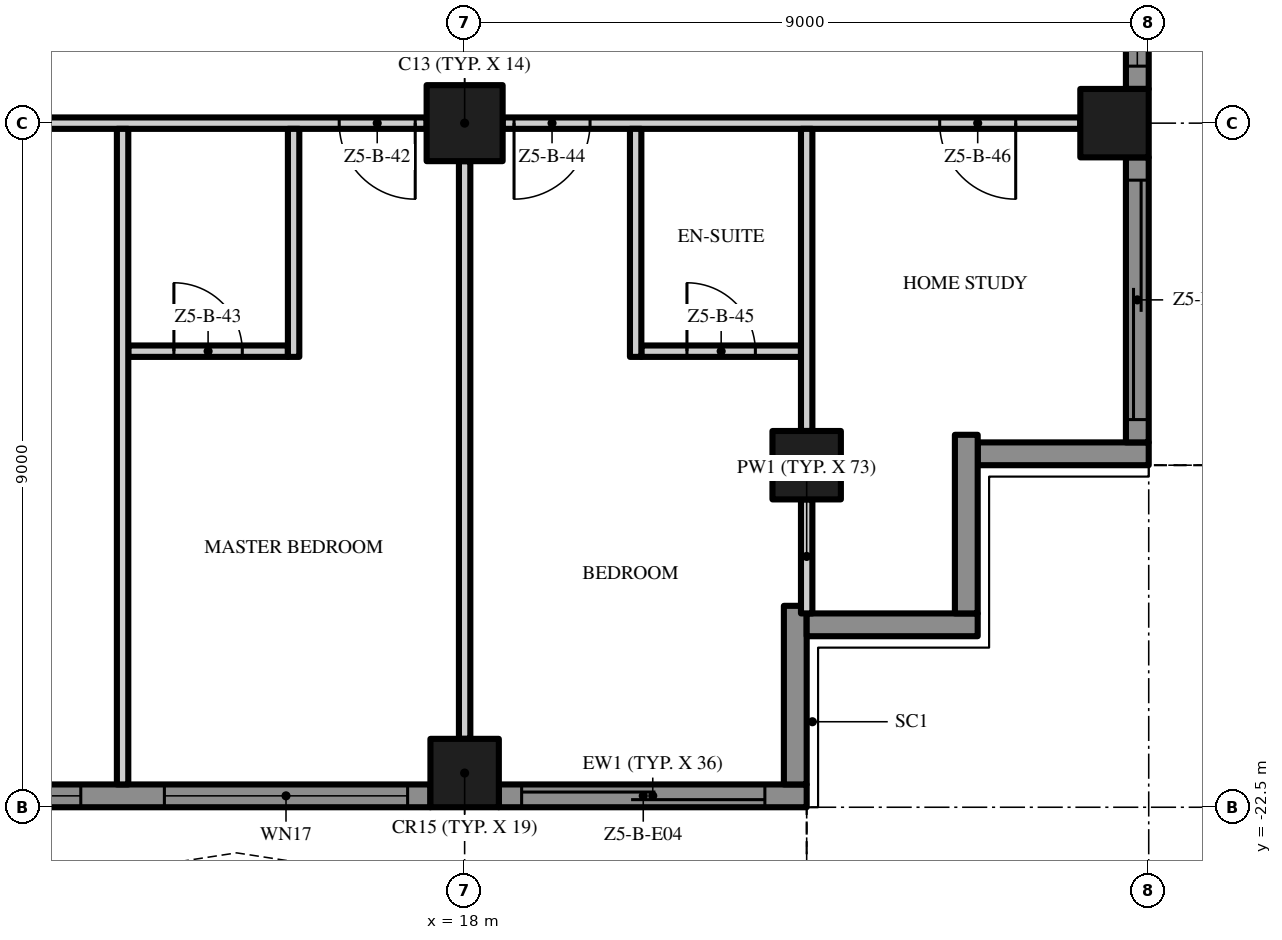
"""IFC4 building model, lengths in metres.
Left out: names, types, materials, properties, quantities, classifications, styles, units other than length and angle.
Written with IfcOpenShell. Run it as: python <this file> out.ifc"""

import sys

from ifc_helpers import new_model, si_unit, direction, frame, frame_2d, origin, origin_2d, place, context, subcontext, project, spatial, polyline, rectangle, outline, extrude, element, fill, save


model = new_model("IFC4")
c1 = context("Model", 3, precision=1e-05, world=origin(), true_north=direction((0.0, 1.0)))
c2 = subcontext(c1, "Body", "Model", "MODEL_VIEW")
j1 = project(units=[si_unit("LENGTHUNIT", "METRE"), si_unit("PLANEANGLEUNIT", "RADIAN")], contexts=[c1])
p1 = place(None, origin())
s1 = spatial("IfcSite", under=j1, at=p1, CompositionType="ELEMENT")
p2 = place(p1, origin())
s2 = spatial("IfcBuilding", under=s1, at=p2, CompositionType="ELEMENT")
p3 = place(p2, frame((0.0, 0.0, 250.2)))
s3 = spatial("IfcBuildingStorey", under=s2, at=p3, CompositionType="ELEMENT", Elevation=250.2)
p4 = place(p3, frame((18.0, -13.5, 0.0), z_axis=(0.0, 0.0, 1.0), x_axis=(1.0, 0.0, 0.0)))
e1 = element("IfcColumn", 1, at=p4, inside=s3, PredefinedType="COLUMN", context=c2, shape_type="SweptSolid", body=[
    extrude(rectangle(XDim=1.0, YDim=1.0, at=origin_2d()), origin(), (0.0, 0.0, 1.0), 3.5),
])
for number, where, z_axis, x_axis in (
    (2, (18.0, -22.05, 0.0), (0.0, 0.0, 1.0), (1.0, 0.0, 0.0)),
    (3, (26.55, -13.5, 0.0), (0.0, 0.0, 1.0), (1.0, 0.0, 0.0)),
    (4, (22.5, -18.0, 0.0), (0.0, 0.0, 1.0), (1.0, 0.0, 0.0)),
):
    element("IfcColumn", number, at=place(p3, frame(where, z_axis=z_axis, x_axis=x_axis)), inside=s3, PredefinedType="COLUMN", context=c2, shape_type="SweptSolid", body=[
        extrude(rectangle(XDim=0.9, YDim=0.9, at=origin_2d()), origin(), (0.0, 0.0, 1.0), 3.5),
    ])
p5 = place(p3, frame((17.55, -22.35, 0.0), z_axis=(0.0, 0.0, 1.0), x_axis=(-1.0, 0.0, 0.0)))
e5 = element("IfcWall", 5, at=p5, inside=s3, PredefinedType="SOLIDWALL", context=c2, shape_type="SweptSolid", body=[
    extrude(rectangle(XDim=8.1, YDim=0.3, at=frame_2d((4.05, 0.0))), origin(), (0.0, 0.0, 1.0), 3.5),
])
p6 = place(p5, frame((4.6, 0.0, 0.45)))
e6 = element("IfcOpeningElement", 6, at=p6, cuts=e5, PredefinedType="OPENING", context=c2, shape_type="SweptSolid", body=[
    extrude(rectangle(XDim=3.2, YDim=2.65, at=frame_2d((1.6, 1.325))), frame((0.0, 0.16, 0.0), z_axis=(0.0, -1.0, 0.0), x_axis=(1.0, 0.0, 0.0)), (0.0, 0.0, 1.0), 0.32),
])
p7 = place(p5, frame((0.3, 0.0, 0.45)))
e7 = element("IfcOpeningElement", 7, at=p7, cuts=e5, PredefinedType="OPENING", context=c2, shape_type="SweptSolid", body=[
    extrude(rectangle(XDim=3.2, YDim=2.65, at=frame_2d((1.6, 1.325))), frame((0.0, 0.16, 0.0), z_axis=(0.0, -1.0, 0.0), x_axis=(1.0, 0.0, 0.0)), (0.0, 0.0, 1.0), 0.32),
])
p8 = place(p3, frame((22.5, -22.35, 0.0), z_axis=(0.0, 0.0, 1.0), x_axis=(-1.0, 0.0, 0.0)))
e8 = element("IfcWall", 8, at=p8, inside=s3, PredefinedType="SOLIDWALL", context=c2, shape_type="SweptSolid", body=[
    extrude(rectangle(XDim=4.05, YDim=0.3, at=frame_2d((2.025, 0.0))), origin(), (0.0, 0.0, 1.0), 3.5),
])
p9 = place(p8, frame((0.55, 0.0, 0.0)))
e9 = element("IfcOpeningElement", 9, at=p9, cuts=e8, PredefinedType="OPENING", context=c2, shape_type="SweptSolid", body=[
    extrude(rectangle(XDim=3.2, YDim=2.4, at=frame_2d((1.6, 1.2))), frame((0.0, 0.16, 0.0), z_axis=(0.0, -1.0, 0.0), x_axis=(1.0, 0.0, 0.0)), (0.0, 0.0, 1.0), 0.32),
])
p10 = place(p3, frame((22.35, -19.85, 0.0), z_axis=(0.0, 0.0, 1.0), x_axis=(0.0, -1.0, 0.0)))
e10 = element("IfcWall", 10, at=p10, inside=s3, PredefinedType="SOLIDWALL", context=c2, shape_type="SweptSolid", body=[
    extrude(rectangle(XDim=2.35, YDim=0.3, at=frame_2d((1.175, 0.0))), origin(), (0.0, 0.0, 1.0), 3.5),
])
p11 = place(p3, frame((24.75, -20.1, 0.0), z_axis=(0.0, 0.0, 1.0), x_axis=(-1.0, 0.0, 0.0)))
e11 = element("IfcWall", 11, at=p11, inside=s3, PredefinedType="SOLIDWALL", context=c2, shape_type="SweptSolid", body=[
    extrude(rectangle(XDim=2.25, YDim=0.3, at=frame_2d((1.125, 0.0))), origin(), (0.0, 0.0, 1.0), 3.5),
])
p12 = place(p3, frame((24.6, -17.6, 0.0), z_axis=(0.0, 0.0, 1.0), x_axis=(0.0, -1.0, 0.0)))
e12 = element("IfcWall", 12, at=p12, inside=s3, PredefinedType="SOLIDWALL", context=c2, shape_type="SweptSolid", body=[
    extrude(rectangle(XDim=2.35, YDim=0.3, at=frame_2d((1.175, 0.0))), origin(), (0.0, 0.0, 1.0), 3.5),
])
p13 = place(p3, frame((27.0, -17.85, 0.0), z_axis=(0.0, 0.0, 1.0), x_axis=(-1.0, 0.0, 0.0)))
e13 = element("IfcWall", 13, at=p13, inside=s3, PredefinedType="SOLIDWALL", context=c2, shape_type="SweptSolid", body=[
    extrude(rectangle(XDim=2.25, YDim=0.3, at=frame_2d((1.125, 0.0))), origin(), (0.0, 0.0, 1.0), 3.5),
])
p14 = place(p3, frame((26.85, -13.95, 0.0), z_axis=(0.0, 0.0, 1.0), x_axis=(0.0, -1.0, 0.0)))
e14 = element("IfcWall", 14, at=p14, inside=s3, PredefinedType="SOLIDWALL", context=c2, shape_type="SweptSolid", body=[
    extrude(rectangle(XDim=3.75, YDim=0.3, at=frame_2d((1.875, 0.0))), origin(), (0.0, 0.0, 1.0), 3.5),
])
p15 = place(p14, frame((0.3, 0.0, 0.0)))
e15 = element("IfcOpeningElement", 15, at=p15, cuts=e14, PredefinedType="OPENING", context=c2, shape_type="SweptSolid", body=[
    extrude(rectangle(XDim=3.15, YDim=2.4, at=frame_2d((1.575, 1.2))), frame((0.0, 0.16, 0.0), z_axis=(0.0, -1.0, 0.0), x_axis=(1.0, 0.0, 0.0)), (0.0, 0.0, 1.0), 0.32),
])
p16 = place(p3, frame((26.85, -4.95, 0.0), z_axis=(0.0, 0.0, 1.0), x_axis=(0.0, -1.0, 0.0)))
e16 = element("IfcWall", 16, at=p16, inside=s3, PredefinedType="SOLIDWALL", context=c2, shape_type="SweptSolid", body=[
    extrude(rectangle(XDim=8.1, YDim=0.3, at=frame_2d((4.05, 0.0))), origin(), (0.0, 0.0, 1.0), 3.5),
])
p17 = place(p16, frame((4.6, 0.0, 0.45)))
e17 = element("IfcOpeningElement", 17, at=p17, cuts=e16, PredefinedType="OPENING", context=c2, shape_type="SweptSolid", body=[
    extrude(rectangle(XDim=3.2, YDim=2.65, at=frame_2d((1.6, 1.325))), frame((0.0, 0.16, 0.0), z_axis=(0.0, -1.0, 0.0), x_axis=(1.0, 0.0, 0.0)), (0.0, 0.0, 1.0), 0.32),
])
p18 = place(p16, frame((0.3, 0.0, 0.45)))
e18 = element("IfcOpeningElement", 18, at=p18, cuts=e16, PredefinedType="OPENING", context=c2, shape_type="SweptSolid", body=[
    extrude(rectangle(XDim=3.2, YDim=2.65, at=frame_2d((1.6, 1.325))), frame((0.0, 0.16, 0.0), z_axis=(0.0, -1.0, 0.0), x_axis=(1.0, 0.0, 0.0)), (0.0, 0.0, 1.0), 0.32),
])
p19 = place(p3, origin())
e19 = element("IfcWall", 19, at=p19, inside=s3, PredefinedType="USERDEFINED", context=c2, shape_type="SweptSolid", body=[
    extrude(outline(polyline([(-22.5, -25.5), (-21.0, -25.271), (-19.5, -24.671), (-18.0, -23.929), (-16.5, -23.329), (-15.0, -23.1), (-13.5, -23.329), (-12.0, -23.929), (-10.5, -24.671), (-9.0, -25.271), (-7.5, -25.5), (-6.0, -25.271), (-4.5, -24.671), (-3.0, -23.929), (-1.5, -23.329), (0.0, -23.1), (1.5, -23.329), (3.0, -23.929), (4.5, -24.671), (6.0, -25.271), (7.5, -25.5), (9.0, -25.271), (10.5, -24.671), (12.0, -23.929), (13.5, -23.329), (15.0, -23.1), (16.5, -23.329), (18.0, -23.929), (19.5, -24.671), (21.0, -25.271), (22.5, -25.5), (22.538, -25.253), (21.066, -25.028), (19.602, -24.442), (18.102, -23.701), (16.566, -23.086), (15.0, -22.847), (13.434, -23.086), (11.898, -23.701), (10.398, -24.442), (8.934, -25.028), (7.5, -25.247), (6.066, -25.028), (4.602, -24.442), (3.102, -23.701), (1.566, -23.086), (0.0, -22.847), (-1.566, -23.086), (-3.102, -23.701), (-4.602, -24.442), (-6.066, -25.028), (-7.5, -25.247), (-8.934, -25.028), (-10.398, -24.442), (-11.898, -23.701), (-13.434, -23.086), (-15.0, -22.847), (-16.566, -23.086), (-18.102, -23.701), (-19.602, -24.442), (-21.066, -25.028), (-22.538, -25.253), (-22.5, -25.5)])), origin(), (0.0, 0.0, 1.0), 0.9),
])
p20 = place(p3, origin())
e20 = element("IfcWall", 20, at=p20, inside=s3, PredefinedType="USERDEFINED", context=c2, shape_type="SweptSolid", body=[
    extrude(outline(polyline([(30.0, -18.0), (29.771, -16.5), (29.171, -15.0), (28.429, -13.5), (27.829, -12.0), (27.6, -10.5), (27.829, -9.0), (28.429, -7.5), (29.171, -6.0), (29.771, -4.5), (30.0, -3.0), (29.771, -1.5), (29.171, 0.0), (28.429, 1.5), (27.829, 3.0), (27.6, 4.5), (27.829, 6.0), (28.429, 7.5), (29.171, 9.0), (29.771, 10.5), (30.0, 12.0), (29.771, 13.5), (29.171, 15.0), (28.429, 16.5), (27.829, 18.0), (27.597, 17.907), (28.201, 16.398), (28.942, 14.898), (29.528, 13.434), (29.747, 12.0), (29.528, 10.566), (28.942, 9.102), (28.201, 7.602), (27.586, 6.066), (27.347, 4.5), (27.586, 2.934), (28.201, 1.398), (28.942, -0.102), (29.528, -1.566), (29.747, -3.0), (29.528, -4.434), (28.942, -5.898), (28.201, -7.398), (27.586, -8.934), (27.347, -10.5), (27.586, -12.066), (28.201, -13.602), (28.942, -15.102), (29.528, -16.566), (29.753, -18.038), (30.0, -18.0)])), origin(), (0.0, 0.0, 1.0), 0.9),
])
p21 = place(p3, frame((13.575, -16.5, 0.0), z_axis=(0.0, 0.0, 1.0), x_axis=(1.0, 0.0, 0.0)))
e21 = element("IfcWall", 21, at=p21, inside=s3, PredefinedType="PARTITIONING", context=c2, shape_type="SweptSolid", body=[
    extrude(rectangle(XDim=2.1, YDim=0.15, at=frame_2d((1.05, 0.0))), origin(), (0.0, 0.0, 1.0), 3.5),
])
p22 = place(p21, frame((0.6, 0.0, 0.0)))
e22 = element("IfcOpeningElement", 22, at=p22, cuts=e21, PredefinedType="OPENING", context=c2, shape_type="SweptSolid", body=[
    extrude(rectangle(XDim=0.9, YDim=2.1, at=frame_2d((0.45, 1.05))), frame((0.0, 0.085, 0.0), z_axis=(0.0, -1.0, 0.0), x_axis=(1.0, 0.0, 0.0)), (0.0, 0.0, 1.0), 0.17),
])
p23 = place(p3, frame((20.325, -16.5, 0.0), z_axis=(0.0, 0.0, 1.0), x_axis=(1.0, 0.0, 0.0)))
e23 = element("IfcWall", 23, at=p23, inside=s3, PredefinedType="PARTITIONING", context=c2, shape_type="SweptSolid", body=[
    extrude(rectangle(XDim=2.1, YDim=0.15, at=frame_2d((1.05, 0.0))), origin(), (0.0, 0.0, 1.0), 3.5),
])
p24 = place(p23, frame((0.6, 0.0, 0.0)))
e24 = element("IfcOpeningElement", 24, at=p24, cuts=e23, PredefinedType="OPENING", context=c2, shape_type="SweptSolid", body=[
    extrude(rectangle(XDim=0.9, YDim=2.1, at=frame_2d((0.45, 1.05))), frame((0.0, 0.085, 0.0), z_axis=(0.0, -1.0, 0.0), x_axis=(1.0, 0.0, 0.0)), (0.0, 0.0, 1.0), 0.17),
])
p25 = place(p3, frame((17.5, -13.5, 0.0), z_axis=(0.0, 0.0, 1.0), x_axis=(-1.0, 0.0, 0.0)))
e25 = element("IfcWall", 25, at=p25, inside=s3, PredefinedType="PARTITIONING", context=c2, shape_type="SweptSolid", body=[
    extrude(rectangle(XDim=8.0, YDim=0.15, at=frame_2d((4.0, 0.0))), origin(), (0.0, 0.0, 1.0), 3.5),
])
p26 = place(p25, frame((6.05, 0.0, 0.0)))
e26 = element("IfcOpeningElement", 26, at=p26, cuts=e25, PredefinedType="OPENING", context=c2, shape_type="SweptSolid", body=[
    extrude(rectangle(XDim=1.8, YDim=2.4, at=frame_2d((0.9, 1.2))), frame((0.0, 0.085, 0.0), z_axis=(0.0, -1.0, 0.0), x_axis=(1.0, 0.0, 0.0)), (0.0, 0.0, 1.0), 0.17),
])
p27 = place(p25, frame((0.15, 0.0, 0.0)))
e27 = element("IfcOpeningElement", 27, at=p27, cuts=e25, PredefinedType="OPENING", context=c2, shape_type="SweptSolid", body=[
    extrude(rectangle(XDim=1.0, YDim=2.4, at=frame_2d((0.5, 1.2))), frame((0.0, 0.085, 0.0), z_axis=(0.0, -1.0, 0.0), x_axis=(1.0, 0.0, 0.0)), (0.0, 0.0, 1.0), 0.17),
])
p28 = place(p3, frame((26.1, -13.5, 0.0), z_axis=(0.0, 0.0, 1.0), x_axis=(-1.0, 0.0, 0.0)))
e28 = element("IfcWall", 28, at=p28, inside=s3, PredefinedType="PARTITIONING", context=c2, shape_type="SweptSolid", body=[
    extrude(rectangle(XDim=7.6, YDim=0.15, at=frame_2d((3.8, 0.0))), origin(), (0.0, 0.0, 1.0), 3.5),
])
p29 = place(p28, frame((6.45, 0.0, 0.0)))
e29 = element("IfcOpeningElement", 29, at=p29, cuts=e28, PredefinedType="OPENING", context=c2, shape_type="SweptSolid", body=[
    extrude(rectangle(XDim=1.0, YDim=2.4, at=frame_2d((0.5, 1.2))), frame((0.0, 0.085, 0.0), z_axis=(0.0, -1.0, 0.0), x_axis=(1.0, 0.0, 0.0)), (0.0, 0.0, 1.0), 0.17),
])
p30 = place(p28, frame((0.85, 0.0, 0.0)))
e30 = element("IfcOpeningElement", 30, at=p30, cuts=e28, PredefinedType="OPENING", context=c2, shape_type="SweptSolid", body=[
    extrude(rectangle(XDim=1.0, YDim=2.4, at=frame_2d((0.5, 1.2))), frame((0.0, 0.085, 0.0), z_axis=(0.0, -1.0, 0.0), x_axis=(1.0, 0.0, 0.0)), (0.0, 0.0, 1.0), 0.17),
])
p31 = place(p3, frame((13.5, -22.2, 0.0), z_axis=(0.0, 0.0, 1.0), x_axis=(0.0, 1.0, 0.0)))
e31 = element("IfcWall", 31, at=p31, inside=s3, PredefinedType="PARTITIONING", context=c2, shape_type="SweptSolid", body=[
    extrude(rectangle(XDim=8.625, YDim=0.15, at=frame_2d((4.312, 0.0))), origin(), (0.0, 0.0, 1.0), 3.5),
])
p32 = place(p3, frame((15.75, -16.575, 0.0), z_axis=(0.0, 0.0, 1.0), x_axis=(0.0, 1.0, 0.0)))
e32 = element("IfcWall", 32, at=p32, inside=s3, PredefinedType="PARTITIONING", context=c2, shape_type="SweptSolid", body=[
    extrude(rectangle(XDim=3.0, YDim=0.15, at=frame_2d((1.5, 0.0))), origin(), (0.0, 0.0, 1.0), 3.5),
])
p33 = place(p3, frame((18.0, -21.6, 0.0), z_axis=(0.0, 0.0, 1.0), x_axis=(0.0, 1.0, 0.0)))
e33 = element("IfcWall", 33, at=p33, inside=s3, PredefinedType="PARTITIONING", context=c2, shape_type="SweptSolid", body=[
    extrude(rectangle(XDim=7.6, YDim=0.15, at=frame_2d((3.8, 0.0))), origin(), (0.0, 0.0, 1.0), 3.5),
])
p34 = place(p3, frame((20.25, -16.575, 0.0), z_axis=(0.0, 0.0, 1.0), x_axis=(0.0, 1.0, 0.0)))
e34 = element("IfcWall", 34, at=p34, inside=s3, PredefinedType="PARTITIONING", context=c2, shape_type="SweptSolid", body=[
    extrude(rectangle(XDim=3.0, YDim=0.15, at=frame_2d((1.5, 0.0))), origin(), (0.0, 0.0, 1.0), 3.5),
])
p35 = place(p3, frame((22.5, -19.95, 0.0), z_axis=(0.0, 0.0, 1.0), x_axis=(0.0, 1.0, 0.0)))
e35 = element("IfcWall", 35, at=p35, inside=s3, PredefinedType="PARTITIONING", context=c2, shape_type="SweptSolid", body=[
    extrude(rectangle(XDim=1.5, YDim=0.15, at=frame_2d((0.75, 0.0))), origin(), (0.0, 0.0, 1.0), 3.5),
])
p36 = place(p3, frame((22.5, -17.55, 0.0), z_axis=(0.0, 0.0, 1.0), x_axis=(0.0, 1.0, 0.0)))
e36 = element("IfcWall", 36, at=p36, inside=s3, PredefinedType="PARTITIONING", context=c2, shape_type="SweptSolid", body=[
    extrude(rectangle(XDim=3.975, YDim=0.15, at=frame_2d((1.988, 0.0))), origin(), (0.0, 0.0, 1.0), 3.5),
])
p37 = place(p6, origin())
e37 = element("IfcWindow", 37, at=p37, inside=s3, PartitioningType="SINGLE_PANEL", PredefinedType="WINDOW", context=c2, shape_type="SweptSolid", body=[
    extrude(rectangle(XDim=3.2, YDim=2.65, at=frame_2d((1.6, 1.325))), frame((0.0, 0.03, 0.0), z_axis=(0.0, -1.0, 0.0), x_axis=(1.0, 0.0, 0.0)), (0.0, 0.0, 1.0), 0.06),
])
fill(e6, e37)
p38 = place(p7, origin())
e38 = element("IfcWindow", 38, at=p38, inside=s3, PartitioningType="SINGLE_PANEL", PredefinedType="WINDOW", context=c2, shape_type="SweptSolid", body=[
    extrude(rectangle(XDim=3.2, YDim=2.65, at=frame_2d((1.6, 1.325))), frame((0.0, 0.03, 0.0), z_axis=(0.0, -1.0, 0.0), x_axis=(1.0, 0.0, 0.0)), (0.0, 0.0, 1.0), 0.06),
])
fill(e7, e38)
p39 = place(p9, origin())
e39 = element("IfcDoor", 39, at=p39, inside=s3, OperationType="SINGLE_SWING_LEFT", PredefinedType="DOOR", context=c2, shape_type="SweptSolid", body=[
    extrude(rectangle(XDim=3.2, YDim=2.4, at=frame_2d((1.6, 1.2))), frame((0.0, 0.025, 0.0), z_axis=(0.0, -1.0, 0.0), x_axis=(1.0, 0.0, 0.0)), (0.0, 0.0, 1.0), 0.05),
])
fill(e9, e39)
p40 = place(p15, origin())
e40 = element("IfcDoor", 40, at=p40, inside=s3, OperationType="SINGLE_SWING_LEFT", PredefinedType="DOOR", context=c2, shape_type="SweptSolid", body=[
    extrude(rectangle(XDim=3.15, YDim=2.4, at=frame_2d((1.575, 1.2))), frame((0.0, 0.025, 0.0), z_axis=(0.0, -1.0, 0.0), x_axis=(1.0, 0.0, 0.0)), (0.0, 0.0, 1.0), 0.05),
])
fill(e15, e40)
p41 = place(p17, origin())
e41 = element("IfcWindow", 41, at=p41, inside=s3, PartitioningType="SINGLE_PANEL", PredefinedType="WINDOW", context=c2, shape_type="SweptSolid", body=[
    extrude(rectangle(XDim=3.2, YDim=2.65, at=frame_2d((1.6, 1.325))), frame((0.0, 0.03, 0.0), z_axis=(0.0, -1.0, 0.0), x_axis=(1.0, 0.0, 0.0)), (0.0, 0.0, 1.0), 0.06),
])
fill(e17, e41)
p42 = place(p27, origin())
e42 = element("IfcDoor", 42, at=p42, inside=s3, OperationType="SINGLE_SWING_LEFT", PredefinedType="DOOR", context=c2, shape_type="SweptSolid", body=[
    extrude(rectangle(XDim=1.0, YDim=2.4, at=frame_2d((0.5, 1.2))), frame((0.0, 0.025, 0.0), z_axis=(0.0, -1.0, 0.0), x_axis=(1.0, 0.0, 0.0)), (0.0, 0.0, 1.0), 0.05),
])
fill(e27, e42)
p43 = place(p22, origin())
e43 = element("IfcDoor", 43, at=p43, inside=s3, OperationType="SINGLE_SWING_LEFT", PredefinedType="DOOR", context=c2, shape_type="SweptSolid", body=[
    extrude(rectangle(XDim=0.9, YDim=2.1, at=frame_2d((0.45, 1.05))), frame((0.0, 0.025, 0.0), z_axis=(0.0, -1.0, 0.0), x_axis=(1.0, 0.0, 0.0)), (0.0, 0.0, 1.0), 0.05),
])
fill(e22, e43)
p44 = place(p29, origin())
e44 = element("IfcDoor", 44, at=p44, inside=s3, OperationType="SINGLE_SWING_RIGHT", PredefinedType="DOOR", context=c2, shape_type="SweptSolid", body=[
    extrude(rectangle(XDim=1.0, YDim=2.4, at=frame_2d((0.5, 1.2))), frame((0.0, 0.025, 0.0), z_axis=(0.0, -1.0, 0.0), x_axis=(1.0, 0.0, 0.0)), (0.0, 0.0, 1.0), 0.05),
])
fill(e29, e44)
p45 = place(p24, origin())
e45 = element("IfcDoor", 45, at=p45, inside=s3, OperationType="SINGLE_SWING_LEFT", PredefinedType="DOOR", context=c2, shape_type="SweptSolid", body=[
    extrude(rectangle(XDim=0.9, YDim=2.1, at=frame_2d((0.45, 1.05))), frame((0.0, 0.025, 0.0), z_axis=(0.0, -1.0, 0.0), x_axis=(1.0, 0.0, 0.0)), (0.0, 0.0, 1.0), 0.05),
])
fill(e24, e45)
p46 = place(p30, origin())
e46 = element("IfcDoor", 46, at=p46, inside=s3, OperationType="SINGLE_SWING_LEFT", PredefinedType="DOOR", context=c2, shape_type="SweptSolid", body=[
    extrude(rectangle(XDim=1.0, YDim=2.4, at=frame_2d((0.5, 1.2))), frame((0.0, 0.025, 0.0), z_axis=(0.0, -1.0, 0.0), x_axis=(1.0, 0.0, 0.0)), (0.0, 0.0, 1.0), 0.05),
])
fill(e30, e46)
save(model, sys.argv[1])
